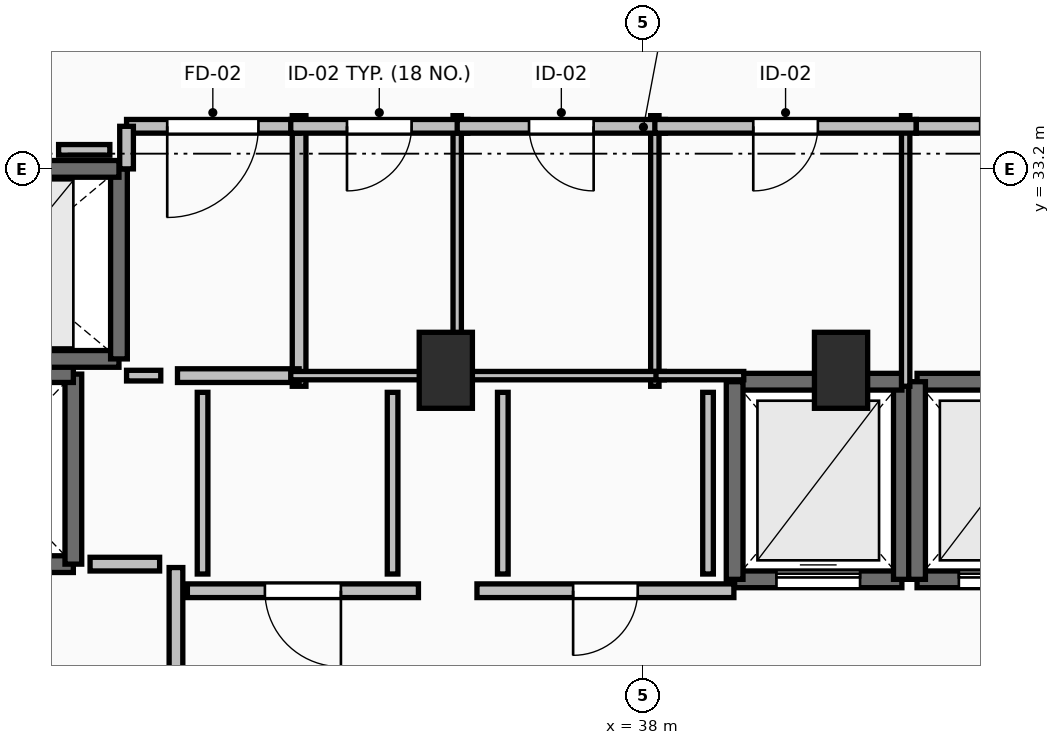
"""IFC4 building model, lengths in metres.
Left out: names, types, materials, properties, quantities, classifications, styles, units other than length and angle.
Written with IfcOpenShell. Run it as: python <this file> out.ifc"""

import sys

from ifc_helpers import new_model, si_unit, direction, frame, frame_2d, origin, origin_2d, place, context, subcontext, project, spatial, rectangle, extrude, element, fill, save


model = new_model("IFC4")
c1 = context("Model", 3, precision=1e-05, world=origin(), true_north=direction((0.0, 1.0)))
c2 = subcontext(c1, "Body", "Model", "MODEL_VIEW")
j1 = project(units=[si_unit("LENGTHUNIT", "METRE"), si_unit("PLANEANGLEUNIT", "RADIAN")], contexts=[c1])
p1 = place(None, origin())
s1 = spatial("IfcSite", under=j1, at=p1, CompositionType="ELEMENT")
p2 = place(p1, origin())
s2 = spatial("IfcBuilding", under=s1, at=p2, CompositionType="ELEMENT")
p3 = place(p2, frame((0.0, 0.0, 276.85)))
s3 = spatial("IfcBuildingStorey", under=s2, at=p3, CompositionType="ELEMENT", Elevation=276.85)
for number, where, z_axis, x_axis in (
    (1, (35.4, 30.55, 0.0), (0.0, 0.0, 1.0), (1.0, 0.0, 0.0)),
    (2, (40.6, 30.55, 0.0), (0.0, 0.0, 1.0), (1.0, 0.0, 0.0)),
):
    element("IfcColumn", number, at=place(p3, frame(where, z_axis=z_axis, x_axis=x_axis)), inside=s3, PredefinedType="PILASTER", context=c2, shape_type="SweptSolid", body=[
        extrude(rectangle(XDim=0.7, YDim=1.0, at=origin_2d()), origin(), (0.0, 0.0, 1.0), 3.55),
    ])
p4 = place(p3, frame((39.2, 27.8, 0.0), z_axis=(0.0, 0.0, 1.0), x_axis=(1.0, 0.0, 0.0)))
e3 = element("IfcWall", 3, at=p4, inside=s3, PredefinedType="SOLIDWALL", context=c2, shape_type="SweptSolid", body=[
    extrude(rectangle(XDim=2.2, YDim=0.22, at=frame_2d((1.1, 0.0))), origin(), (0.0, 0.0, 1.0), 3.19),
])
p5 = place(p4, frame((0.55, 0.0, 0.0)))
e4 = element("IfcOpeningElement", 4, at=p5, cuts=e3, PredefinedType="OPENING", context=c2, shape_type="SweptSolid", body=[
    extrude(rectangle(XDim=1.1, YDim=2.2, at=frame_2d((0.55, 1.1))), frame((0.0, 0.125, 0.0), z_axis=(0.0, -1.0, 0.0), x_axis=(1.0, 0.0, 0.0)), (0.0, 0.0, 1.0), 0.25),
])
p6 = place(p3, frame((41.4, 27.8, 0.0), z_axis=(0.0, 0.0, 1.0), x_axis=(0.0, 1.0, 0.0)))
e5 = element("IfcWall", 5, at=p6, inside=s3, PredefinedType="SOLIDWALL", context=c2, shape_type="SweptSolid", body=[
    extrude(rectangle(XDim=2.6, YDim=0.22, at=frame_2d((1.3, 0.0))), origin(), (0.0, 0.0, 1.0), 3.19),
])
p7 = place(p3, frame((41.4, 30.4, 0.0), z_axis=(0.0, 0.0, 1.0), x_axis=(-1.0, 0.0, 0.0)))
e6 = element("IfcWall", 6, at=p7, inside=s3, PredefinedType="SOLIDWALL", context=c2, shape_type="SweptSolid", body=[
    extrude(rectangle(XDim=2.2, YDim=0.22, at=frame_2d((1.1, 0.0))), origin(), (0.0, 0.0, 1.0), 3.19),
])
p8 = place(p3, frame((39.2, 30.4, 0.0), z_axis=(0.0, 0.0, 1.0), x_axis=(0.0, -1.0, 0.0)))
e7 = element("IfcWall", 7, at=p8, inside=s3, PredefinedType="SOLIDWALL", context=c2, shape_type="SweptSolid", body=[
    extrude(rectangle(XDim=2.6, YDim=0.22, at=frame_2d((1.3, 0.0))), origin(), (0.0, 0.0, 1.0), 3.19),
])
p9 = place(p3, frame((41.6, 27.8, 0.0), z_axis=(0.0, 0.0, 1.0), x_axis=(1.0, 0.0, 0.0)))
e8 = element("IfcWall", 8, at=p9, inside=s3, PredefinedType="SOLIDWALL", context=c2, shape_type="SweptSolid", body=[
    extrude(rectangle(XDim=2.2, YDim=0.22, at=frame_2d((1.1, 0.0))), origin(), (0.0, 0.0, 1.0), 3.19),
])
p10 = place(p9, frame((0.55, 0.0, 0.0)))
e9 = element("IfcOpeningElement", 9, at=p10, cuts=e8, PredefinedType="OPENING", context=c2, shape_type="SweptSolid", body=[
    extrude(rectangle(XDim=1.1, YDim=2.2, at=frame_2d((0.55, 1.1))), frame((0.0, 0.125, 0.0), z_axis=(0.0, -1.0, 0.0), x_axis=(1.0, 0.0, 0.0)), (0.0, 0.0, 1.0), 0.25),
])
p11 = place(p3, frame((43.8, 30.4, 0.0), z_axis=(0.0, 0.0, 1.0), x_axis=(-1.0, 0.0, 0.0)))
e10 = element("IfcWall", 10, at=p11, inside=s3, PredefinedType="SOLIDWALL", context=c2, shape_type="SweptSolid", body=[
    extrude(rectangle(XDim=2.2, YDim=0.22, at=frame_2d((1.1, 0.0))), origin(), (0.0, 0.0, 1.0), 3.19),
])
p12 = place(p3, frame((41.6, 30.4, 0.0), z_axis=(0.0, 0.0, 1.0), x_axis=(0.0, -1.0, 0.0)))
e11 = element("IfcWall", 11, at=p12, inside=s3, PredefinedType="SOLIDWALL", context=c2, shape_type="SweptSolid", body=[
    extrude(rectangle(XDim=2.6, YDim=0.22, at=frame_2d((1.3, 0.0))), origin(), (0.0, 0.0, 1.0), 3.19),
])
p13 = place(p3, frame((28.1, 28.0, 0.0), z_axis=(0.0, 0.0, 1.0), x_axis=(1.0, 0.0, 0.0)))
e12 = element("IfcWall", 12, at=p13, inside=s3, PredefinedType="SHEAR", context=c2, shape_type="SweptSolid", body=[
    extrude(rectangle(XDim=2.4, YDim=0.22, at=frame_2d((1.2, 0.0))), origin(), (0.0, 0.0, 1.0), 3.19),
])
p14 = place(p13, frame((0.6, 0.0, 0.0)))
e13 = element("IfcOpeningElement", 13, at=p14, cuts=e12, PredefinedType="OPENING", context=c2, shape_type="SweptSolid", body=[
    extrude(rectangle(XDim=1.2, YDim=2.2, at=frame_2d((0.6, 1.1))), frame((0.0, 0.125, 0.0), z_axis=(0.0, -1.0, 0.0), x_axis=(1.0, 0.0, 0.0)), (0.0, 0.0, 1.0), 0.25),
])
p15 = place(p3, frame((30.5, 28.0, 0.0), z_axis=(0.0, 0.0, 1.0), x_axis=(0.0, 1.0, 0.0)))
e14 = element("IfcWall", 14, at=p15, inside=s3, PredefinedType="SHEAR", context=c2, shape_type="SweptSolid", body=[
    extrude(rectangle(XDim=2.5, YDim=0.22, at=frame_2d((1.25, 0.0))), origin(), (0.0, 0.0, 1.0), 3.19),
])
p16 = place(p3, frame((30.5, 30.5, 0.0), z_axis=(0.0, 0.0, 1.0), x_axis=(-1.0, 0.0, 0.0)))
e15 = element("IfcWall", 15, at=p16, inside=s3, PredefinedType="SHEAR", context=c2, shape_type="SweptSolid", body=[
    extrude(rectangle(XDim=2.4, YDim=0.22, at=frame_2d((1.2, 0.0))), origin(), (0.0, 0.0, 1.0), 3.19),
])
p17 = place(p3, frame((28.1, 30.7, 0.0), z_axis=(0.0, 0.0, 1.0), x_axis=(1.0, 0.0, 0.0)))
e16 = element("IfcWall", 16, at=p17, inside=s3, PredefinedType="SOLIDWALL", context=c2, shape_type="SweptSolid", body=[
    extrude(rectangle(XDim=3.0, YDim=0.22, at=frame_2d((1.5, 0.0))), origin(), (0.0, 0.0, 1.0), 3.19),
])
p18 = place(p3, frame((31.1, 30.7, 0.0), z_axis=(0.0, 0.0, 1.0), x_axis=(0.0, 1.0, 0.0)))
e17 = element("IfcWall", 17, at=p18, inside=s3, PredefinedType="SOLIDWALL", context=c2, shape_type="SweptSolid", body=[
    extrude(rectangle(XDim=2.5, YDim=0.22, at=frame_2d((1.25, 0.0))), origin(), (0.0, 0.0, 1.0), 3.19),
])
p19 = place(p3, frame((31.1, 33.2, 0.0), z_axis=(0.0, 0.0, 1.0), x_axis=(-1.0, 0.0, 0.0)))
e18 = element("IfcWall", 18, at=p19, inside=s3, PredefinedType="SOLIDWALL", context=c2, shape_type="SweptSolid", body=[
    extrude(rectangle(XDim=3.0, YDim=0.22, at=frame_2d((1.5, 0.0))), origin(), (0.0, 0.0, 1.0), 3.19),
])
p20 = place(p19, frame((0.9, 0.0, 0.0)))
e19 = element("IfcOpeningElement", 19, at=p20, cuts=e18, PredefinedType="OPENING", context=c2, shape_type="SweptSolid", body=[
    extrude(rectangle(XDim=1.2, YDim=2.2, at=frame_2d((0.6, 1.1))), frame((0.0, 0.125, 0.0), z_axis=(0.0, -1.0, 0.0), x_axis=(1.0, 0.0, 0.0)), (0.0, 0.0, 1.0), 0.25),
])
p21 = place(p3, frame((31.85, 24.045, 0.0), z_axis=(0.0, 0.0, 1.0), x_axis=(0.0, 1.0, 0.0)))
e20 = element("IfcWall", 20, at=p21, inside=s3, PredefinedType="PARTITIONING", context=c2, shape_type="SweptSolid", body=[
    extrude(rectangle(XDim=3.91, YDim=0.18, at=frame_2d((1.955, 0.0))), origin(), (0.0, 0.0, 1.0), 3.19),
])
p22 = place(p21, frame((1.355, 0.0, 0.0)))
e21 = element("IfcOpeningElement", 21, at=p22, cuts=e20, PredefinedType="OPENING", context=c2, shape_type="SweptSolid", body=[
    extrude(rectangle(XDim=1.2, YDim=2.15, at=frame_2d((0.6, 1.075))), frame((0.0, 0.105, 0.0), z_axis=(0.0, -1.0, 0.0), x_axis=(1.0, 0.0, 0.0)), (0.0, 0.0, 1.0), 0.21),
])
p23 = place(p3, frame((33.47, 30.34, 0.0), z_axis=(0.0, 0.0, 1.0), x_axis=(0.0, 1.0, 0.0)))
e22 = element("IfcWall", 22, at=p23, inside=s3, PredefinedType="PARTITIONING", context=c2, shape_type="SweptSolid", body=[
    extrude(rectangle(XDim=3.56, YDim=0.18, at=frame_2d((1.78, 0.0))), origin(), (0.0, 0.0, 1.0), 3.19),
])
p24 = place(p3, frame((31.87, 30.48, 0.0), z_axis=(0.0, 0.0, 1.0), x_axis=(1.0, 0.0, 0.0)))
e23 = element("IfcWall", 23, at=p24, inside=s3, PredefinedType="PARTITIONING", context=c2, shape_type="SweptSolid", body=[
    extrude(rectangle(XDim=1.6, YDim=0.18, at=frame_2d((0.8, 0.0))), origin(), (0.0, 0.0, 1.0), 3.19),
])
p25 = place(p3, frame((33.47, 33.76, 0.0), z_axis=(0.0, 0.0, 1.0), x_axis=(-1.0, 0.0, 0.0)))
e24 = element("IfcWall", 24, at=p25, inside=s3, PredefinedType="PARTITIONING", context=c2, shape_type="SweptSolid", body=[
    extrude(rectangle(XDim=2.27, YDim=0.18, at=frame_2d((1.135, 0.0))), origin(), (0.0, 0.0, 1.0), 3.19),
])
p26 = place(p25, frame((0.535, 0.0, 0.0)))
e25 = element("IfcOpeningElement", 25, at=p26, cuts=e24, PredefinedType="OPENING", context=c2, shape_type="SweptSolid", body=[
    extrude(rectangle(XDim=1.2, YDim=2.15, at=frame_2d((0.6, 1.075))), frame((0.0, 0.105, 0.0), z_axis=(0.0, -1.0, 0.0), x_axis=(1.0, 0.0, 0.0)), (0.0, 0.0, 1.0), 0.21),
])
p27 = place(p3, frame((31.2, 33.76, 0.0), z_axis=(0.0, 0.0, 1.0), x_axis=(0.0, -1.0, 0.0)))
e26 = element("IfcWall", 26, at=p27, inside=s3, PredefinedType="PARTITIONING", context=c2, shape_type="SweptSolid", body=[
    extrude(rectangle(XDim=0.56, YDim=0.18, at=frame_2d((0.28, 0.0))), origin(), (0.0, 0.0, 1.0), 3.19),
])
p28 = place(p3, frame((35.04, 27.65, 0.0), z_axis=(0.0, 0.0, 1.0), x_axis=(-1.0, 0.0, 0.0)))
e27 = element("IfcWall", 27, at=p28, inside=s3, PredefinedType="PARTITIONING", context=c2, shape_type="SweptSolid", body=[
    extrude(rectangle(XDim=3.04, YDim=0.18, at=frame_2d((1.52, 0.0))), origin(), (0.0, 0.0, 1.0), 3.19),
])
p29 = place(p28, frame((1.02, 0.0, 0.0)))
e28 = element("IfcOpeningElement", 28, at=p29, cuts=e27, PredefinedType="OPENING", context=c2, shape_type="SweptSolid", body=[
    extrude(rectangle(XDim=1.0, YDim=2.15, at=frame_2d((0.5, 1.075))), frame((0.0, 0.105, 0.0), z_axis=(0.0, -1.0, 0.0), x_axis=(1.0, 0.0, 0.0)), (0.0, 0.0, 1.0), 0.21),
])
p30 = place(p3, frame((39.19, 27.65, 0.0), z_axis=(0.0, 0.0, 1.0), x_axis=(-1.0, 0.0, 0.0)))
e29 = element("IfcWall", 29, at=p30, inside=s3, PredefinedType="PARTITIONING", context=c2, shape_type="SweptSolid", body=[
    extrude(rectangle(XDim=3.38, YDim=0.18, at=frame_2d((1.69, 0.0))), origin(), (0.0, 0.0, 1.0), 3.19),
])
p31 = place(p30, frame((1.265, 0.0, 0.0)))
e30 = element("IfcOpeningElement", 30, at=p31, cuts=e29, PredefinedType="OPENING", context=c2, shape_type="SweptSolid", body=[
    extrude(rectangle(XDim=0.85, YDim=2.1, at=frame_2d((0.425, 1.05))), frame((0.0, 0.105, 0.0), z_axis=(0.0, -1.0, 0.0), x_axis=(1.0, 0.0, 0.0)), (0.0, 0.0, 1.0), 0.21),
])
p32 = place(p3, frame((35.55, 30.34, 0.0), z_axis=(0.0, 0.0, 1.0), x_axis=(0.0, 1.0, 0.0)))
e31 = element("IfcWall", 31, at=p32, inside=s3, PredefinedType="PARTITIONING", context=c2, shape_type="SweptSolid", body=[
    extrude(rectangle(XDim=3.56, YDim=0.11, at=frame_2d((1.78, 0.0))), origin(), (0.0, 0.0, 1.0), 2.382),
])
p33 = place(p3, frame((33.36, 30.48, 0.0), z_axis=(0.0, 0.0, 1.0), x_axis=(1.0, 0.0, 0.0)))
e32 = element("IfcWall", 32, at=p33, inside=s3, PredefinedType="PARTITIONING", context=c2, shape_type="SweptSolid", body=[
    extrude(rectangle(XDim=1.81, YDim=0.11, at=frame_2d((0.905, 0.0))), origin(), (0.0, 0.0, 1.0), 3.19),
])
p34 = place(p3, frame((35.69, 33.76, 0.0), z_axis=(0.0, 0.0, 1.0), x_axis=(-1.0, 0.0, 0.0)))
e33 = element("IfcWall", 33, at=p34, inside=s3, PredefinedType="PARTITIONING", context=c2, shape_type="SweptSolid", body=[
    extrude(rectangle(XDim=2.33, YDim=0.18, at=frame_2d((1.165, 0.0))), origin(), (0.0, 0.0, 1.0), 3.19),
])
p35 = place(p34, frame((0.74, 0.0, 0.0)))
e34 = element("IfcOpeningElement", 34, at=p35, cuts=e33, PredefinedType="OPENING", context=c2, shape_type="SweptSolid", body=[
    extrude(rectangle(XDim=0.85, YDim=2.1, at=frame_2d((0.425, 1.05))), frame((0.0, 0.105, 0.0), z_axis=(0.0, -1.0, 0.0), x_axis=(1.0, 0.0, 0.0)), (0.0, 0.0, 1.0), 0.21),
])
p36 = place(p3, frame((38.15, 30.34, 0.0), z_axis=(0.0, 0.0, 1.0), x_axis=(0.0, 1.0, 0.0)))
e35 = element("IfcWall", 35, at=p36, inside=s3, PredefinedType="PARTITIONING", context=c2, shape_type="SweptSolid", body=[
    extrude(rectangle(XDim=3.56, YDim=0.11, at=frame_2d((1.78, 0.0))), origin(), (0.0, 0.0, 1.0), 2.382),
])
p37 = place(p3, frame((35.68, 30.48, 0.0), z_axis=(0.0, 0.0, 1.0), x_axis=(1.0, 0.0, 0.0)))
e36 = element("IfcWall", 36, at=p37, inside=s3, PredefinedType="PARTITIONING", context=c2, shape_type="SweptSolid", body=[
    extrude(rectangle(XDim=2.595, YDim=0.11, at=frame_2d((1.297, 0.0))), origin(), (0.0, 0.0, 1.0), 2.382),
])
p38 = place(p3, frame((38.29, 33.76, 0.0), z_axis=(0.0, 0.0, 1.0), x_axis=(-1.0, 0.0, 0.0)))
e37 = element("IfcWall", 37, at=p38, inside=s3, PredefinedType="PARTITIONING", context=c2, shape_type="SweptSolid", body=[
    extrude(rectangle(XDim=2.74, YDim=0.18, at=frame_2d((1.37, 0.0))), origin(), (0.0, 0.0, 1.0), 3.19),
])
p39 = place(p38, frame((0.945, 0.0, 0.0)))
e38 = element("IfcOpeningElement", 38, at=p39, cuts=e37, PredefinedType="OPENING", context=c2, shape_type="SweptSolid", body=[
    extrude(rectangle(XDim=0.85, YDim=2.1, at=frame_2d((0.425, 1.05))), frame((0.0, 0.105, 0.0), z_axis=(0.0, -1.0, 0.0), x_axis=(1.0, 0.0, 0.0)), (0.0, 0.0, 1.0), 0.21),
])
p40 = place(p3, frame((41.45, 30.34, 0.0), z_axis=(0.0, 0.0, 1.0), x_axis=(0.0, 1.0, 0.0)))
e39 = element("IfcWall", 39, at=p40, inside=s3, PredefinedType="PARTITIONING", context=c2, shape_type="SweptSolid", body=[
    extrude(rectangle(XDim=3.56, YDim=0.11, at=frame_2d((1.78, 0.0))), origin(), (0.0, 0.0, 1.0), 3.19),
])
p41 = place(p3, frame((38.165, 30.48, 0.0), z_axis=(0.0, 0.0, 1.0), x_axis=(1.0, 0.0, 0.0)))
e40 = element("IfcWall", 40, at=p41, inside=s3, PredefinedType="PARTITIONING", context=c2, shape_type="SweptSolid", body=[
    extrude(rectangle(XDim=1.155, YDim=0.11, at=frame_2d((0.578, 0.0))), origin(), (0.0, 0.0, 1.0), 2.382),
])
p42 = place(p3, frame((41.59, 33.76, 0.0), z_axis=(0.0, 0.0, 1.0), x_axis=(-1.0, 0.0, 0.0)))
e41 = element("IfcWall", 41, at=p42, inside=s3, PredefinedType="PARTITIONING", context=c2, shape_type="SweptSolid", body=[
    extrude(rectangle(XDim=3.44, YDim=0.18, at=frame_2d((1.72, 0.0))), origin(), (0.0, 0.0, 1.0), 3.19),
])
p43 = place(p42, frame((1.295, 0.0, 0.0)))
e42 = element("IfcOpeningElement", 42, at=p43, cuts=e41, PredefinedType="OPENING", context=c2, shape_type="SweptSolid", body=[
    extrude(rectangle(XDim=0.85, YDim=2.1, at=frame_2d((0.425, 1.05))), frame((0.0, 0.105, 0.0), z_axis=(0.0, -1.0, 0.0), x_axis=(1.0, 0.0, 0.0)), (0.0, 0.0, 1.0), 0.21),
])
p44 = place(p3, frame((44.12, 33.76, 0.0), z_axis=(0.0, 0.0, 1.0), x_axis=(-1.0, 0.0, 0.0)))
e43 = element("IfcWall", 43, at=p44, inside=s3, PredefinedType="PARTITIONING", context=c2, shape_type="SweptSolid", body=[
    extrude(rectangle(XDim=2.53, YDim=0.18, at=frame_2d((1.265, 0.0))), origin(), (0.0, 0.0, 1.0), 3.19),
])
p45 = place(p44, frame((0.84, 0.0, 0.0)))
e44 = element("IfcOpeningElement", 44, at=p45, cuts=e43, PredefinedType="OPENING", context=c2, shape_type="SweptSolid", body=[
    extrude(rectangle(XDim=0.85, YDim=2.1, at=frame_2d((0.425, 1.05))), frame((0.0, 0.105, 0.0), z_axis=(0.0, -1.0, 0.0), x_axis=(1.0, 0.0, 0.0)), (0.0, 0.0, 1.0), 0.21),
])
p46 = place(p3, frame((31.635, 28.0, 0.0), z_axis=(0.0, 0.0, 1.0), x_axis=(-1.0, 0.0, 0.0)))
e45 = element("IfcWall", 45, at=p46, inside=s3, PredefinedType="PARTITIONING", context=c2, shape_type="SweptSolid", body=[
    extrude(rectangle(XDim=0.915, YDim=0.18, at=frame_2d((0.458, 0.0))), origin(), (0.0, 0.0, 1.0), 3.19),
])
p47 = place(p3, frame((31.2, 30.48, 0.0), z_axis=(0.0, 0.0, 1.0), x_axis=(1.0, 0.0, 0.0)))
e46 = element("IfcWall", 46, at=p47, inside=s3, PredefinedType="PARTITIONING", context=c2, shape_type="SweptSolid", body=[
    extrude(rectangle(XDim=0.45, YDim=0.14, at=frame_2d((0.225, 0.0))), origin(), (0.0, 0.0, 1.0), 3.19),
])
for number, where, z_axis, x_axis in (
    (47, (32.2, 30.26, 0.0), (0.0, 0.0, 1.0), (0.0, -1.0, 0.0)),
    (48, (34.7, 27.87, 0.0), (0.0, 0.0, 1.0), (0.0, 1.0, 0.0)),
    (49, (36.15, 30.26, 0.0), (0.0, 0.0, 1.0), (0.0, -1.0, 0.0)),
    (50, (38.85, 27.87, 0.0), (0.0, 0.0, 1.0), (0.0, 1.0, 0.0)),
):
    element("IfcWall", number, at=place(p3, frame(where, z_axis=z_axis, x_axis=x_axis)), inside=s3, PredefinedType="PARTITIONING", context=c2, shape_type="SweptSolid", body=[
        extrude(rectangle(XDim=2.39, YDim=0.14, at=frame_2d((1.195, 0.0))), origin(), (0.0, 0.0, 1.0), 3.19),
    ])
p48 = place(p3, frame((30.98, 33.45, 0.0), z_axis=(0.0, 0.0, 1.0), x_axis=(-1.0, 0.0, 0.0)))
e51 = element("IfcWall", 51, at=p48, inside=s3, PredefinedType="PARTITIONING", context=c2, shape_type="SweptSolid", body=[
    extrude(rectangle(XDim=0.674, YDim=0.14, at=frame_2d((0.337, 0.0))), origin(), (0.0, 0.0, 1.0), 3.19),
])
p49 = place(p5, origin())
e52 = element("IfcDoor", 52, at=p49, inside=s3, OperationType="SLIDING_TO_LEFT", PredefinedType="DOOR", context=c2, shape_type="SweptSolid", body=[
    extrude(rectangle(XDim=1.1, YDim=2.2, at=frame_2d((0.55, 1.1))), frame((0.0, 0.025, 0.0), z_axis=(0.0, -1.0, 0.0), x_axis=(1.0, 0.0, 0.0)), (0.0, 0.0, 1.0), 0.05),
])
fill(e4, e52)
p50 = place(p10, origin())
e53 = element("IfcDoor", 53, at=p50, inside=s3, OperationType="SLIDING_TO_LEFT", PredefinedType="DOOR", context=c2, shape_type="SweptSolid", body=[
    extrude(rectangle(XDim=1.1, YDim=2.2, at=frame_2d((0.55, 1.1))), frame((0.0, 0.025, 0.0), z_axis=(0.0, -1.0, 0.0), x_axis=(1.0, 0.0, 0.0)), (0.0, 0.0, 1.0), 0.05),
])
fill(e9, e53)
p51 = place(p26, origin())
e54 = element("IfcDoor", 54, at=p51, inside=s3, OperationType="SINGLE_SWING_RIGHT", PredefinedType="DOOR", context=c2, shape_type="SweptSolid", body=[
    extrude(rectangle(XDim=1.2, YDim=2.15, at=frame_2d((0.6, 1.075))), frame((0.0, 0.025, 0.0), z_axis=(0.0, -1.0, 0.0), x_axis=(1.0, 0.0, 0.0)), (0.0, 0.0, 1.0), 0.05),
])
fill(e25, e54)
p52 = place(p29, origin())
e55 = element("IfcDoor", 55, at=p52, inside=s3, OperationType="SINGLE_SWING_LEFT", PredefinedType="DOOR", context=c2, shape_type="SweptSolid", body=[
    extrude(rectangle(XDim=1.0, YDim=2.15, at=frame_2d((0.5, 1.075))), frame((0.0, 0.025, 0.0), z_axis=(0.0, -1.0, 0.0), x_axis=(1.0, 0.0, 0.0)), (0.0, 0.0, 1.0), 0.05),
])
fill(e28, e55)
p53 = place(p31, origin())
e56 = element("IfcDoor", 56, at=p53, inside=s3, OperationType="SINGLE_SWING_RIGHT", PredefinedType="DOOR", context=c2, shape_type="SweptSolid", body=[
    extrude(rectangle(XDim=0.85, YDim=2.1, at=frame_2d((0.425, 1.05))), frame((0.0, 0.025, 0.0), z_axis=(0.0, -1.0, 0.0), x_axis=(1.0, 0.0, 0.0)), (0.0, 0.0, 1.0), 0.05),
])
fill(e30, e56)
p54 = place(p35, origin())
e57 = element("IfcDoor", 57, at=p54, inside=s3, OperationType="SINGLE_SWING_RIGHT", PredefinedType="DOOR", context=c2, shape_type="SweptSolid", body=[
    extrude(rectangle(XDim=0.85, YDim=2.1, at=frame_2d((0.425, 1.05))), frame((0.0, 0.025, 0.0), z_axis=(0.0, -1.0, 0.0), x_axis=(1.0, 0.0, 0.0)), (0.0, 0.0, 1.0), 0.05),
])
fill(e34, e57)
p55 = place(p39, origin())
e58 = element("IfcDoor", 58, at=p55, inside=s3, OperationType="SINGLE_SWING_LEFT", PredefinedType="DOOR", context=c2, shape_type="SweptSolid", body=[
    extrude(rectangle(XDim=0.85, YDim=2.1, at=frame_2d((0.425, 1.05))), frame((0.0, 0.025, 0.0), z_axis=(0.0, -1.0, 0.0), x_axis=(1.0, 0.0, 0.0)), (0.0, 0.0, 1.0), 0.05),
])
fill(e38, e58)
p56 = place(p43, origin())
e59 = element("IfcDoor", 59, at=p56, inside=s3, OperationType="SINGLE_SWING_RIGHT", PredefinedType="DOOR", context=c2, shape_type="SweptSolid", body=[
    extrude(rectangle(XDim=0.85, YDim=2.1, at=frame_2d((0.425, 1.05))), frame((0.0, 0.025, 0.0), z_axis=(0.0, -1.0, 0.0), x_axis=(1.0, 0.0, 0.0)), (0.0, 0.0, 1.0), 0.05),
])
fill(e42, e59)
save(model, sys.argv[1])
